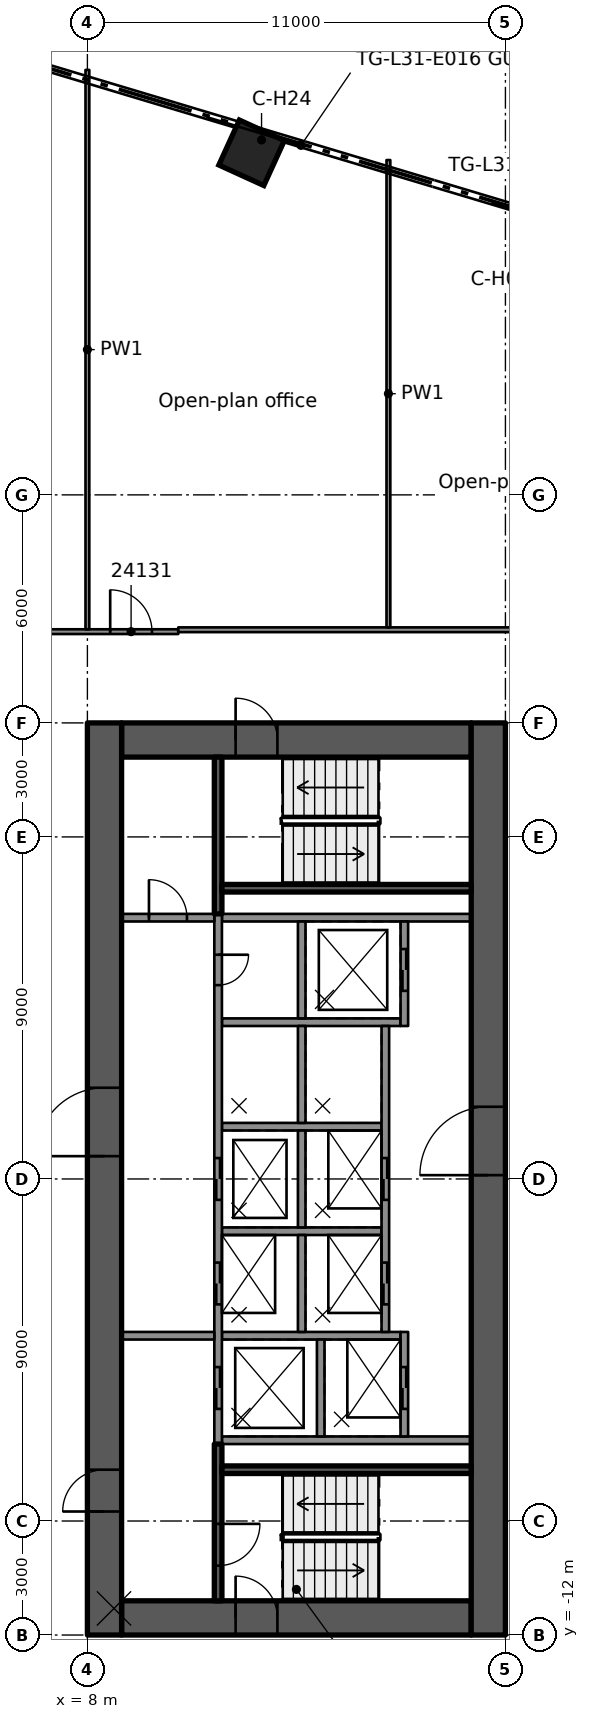
"""IFC4 building model, lengths in metres.
Left out: names, types, materials, properties, quantities, classifications, styles, units other than length and angle.
Written with IfcOpenShell. Run it as: python <this file> out.ifc"""

import sys

from ifc_helpers import new_model, si_unit, direction, frame, frame_2d, origin, origin_2d, place, context, subcontext, project, spatial, rectangle, extrude, element, fill, save


model = new_model("IFC4")
c1 = context("Model", 3, precision=1e-05, world=origin(), true_north=direction((0.0, 1.0)))
c2 = subcontext(c1, "Body", "Model", "MODEL_VIEW")
j1 = project(units=[si_unit("LENGTHUNIT", "METRE"), si_unit("PLANEANGLEUNIT", "RADIAN")], contexts=[c1])
p1 = place(None, origin())
s1 = spatial("IfcSite", under=j1, at=p1, CompositionType="ELEMENT")
p2 = place(p1, origin())
s2 = spatial("IfcBuilding", under=s1, at=p2, CompositionType="ELEMENT")
p3 = place(p2, frame((0.0, 0.0, 123.7)))
s3 = spatial("IfcBuildingStorey", under=s2, at=p3, CompositionType="ELEMENT", Elevation=123.7)
p4 = place(p3, frame((8.9, 11.55, 0.0), z_axis=(0.0, 0.0, 1.0), x_axis=(1.0, 0.0, 0.0)))
e1 = element("IfcWall", 1, at=p4, inside=s3, PredefinedType="SHEAR", context=c2, shape_type="SweptSolid", body=[
    extrude(rectangle(XDim=9.2, YDim=0.9, at=frame_2d((4.6, 0.0))), origin(), (0.0, 0.0, 1.0), 3.5),
])
p5 = place(p4, frame((3.0, 0.0, 0.0)))
e2 = element("IfcOpeningElement", 2, at=p5, cuts=e1, PredefinedType="OPENING", context=c2, shape_type="SweptSolid", body=[
    extrude(rectangle(XDim=1.1, YDim=2.1, at=frame_2d((0.55, 1.05))), frame((0.0, 0.46, 0.0), z_axis=(0.0, -1.0, 0.0), x_axis=(1.0, 0.0, 0.0)), (0.0, 0.0, 1.0), 0.92),
])
p6 = place(p3, frame((8.9, -11.55, 0.0), z_axis=(0.0, 0.0, 1.0), x_axis=(1.0, 0.0, 0.0)))
e3 = element("IfcWall", 3, at=p6, inside=s3, PredefinedType="SHEAR", context=c2, shape_type="SweptSolid", body=[
    extrude(rectangle(XDim=9.2, YDim=0.9, at=frame_2d((4.6, 0.0))), origin(), (0.0, 0.0, 1.0), 3.5),
])
p7 = place(p6, frame((3.0, 0.0, 0.0)))
e4 = element("IfcOpeningElement", 4, at=p7, cuts=e3, PredefinedType="OPENING", context=c2, shape_type="SweptSolid", body=[
    extrude(rectangle(XDim=1.1, YDim=2.1, at=frame_2d((0.55, 1.05))), frame((0.0, 0.46, 0.0), z_axis=(0.0, -1.0, 0.0), x_axis=(1.0, 0.0, 0.0)), (0.0, 0.0, 1.0), 0.92),
])
p8 = place(p3, frame((8.45, -12.0, 0.0), z_axis=(0.0, 0.0, 1.0), x_axis=(0.0, 1.0, 0.0)))
e5 = element("IfcWall", 5, at=p8, inside=s3, PredefinedType="SHEAR", context=c2, shape_type="SweptSolid", body=[
    extrude(rectangle(XDim=24.0, YDim=0.9, at=frame_2d((12.0, 0.0))), origin(), (0.0, 0.0, 1.0), 3.5),
])
p9 = place(p8, frame((12.6, 0.0, 0.0)))
e6 = element("IfcOpeningElement", 6, at=p9, cuts=e5, PredefinedType="OPENING", context=c2, shape_type="SweptSolid", body=[
    extrude(rectangle(XDim=1.8, YDim=2.1, at=frame_2d((0.9, 1.05))), frame((0.0, 0.46, 0.0), z_axis=(0.0, -1.0, 0.0), x_axis=(1.0, 0.0, 0.0)), (0.0, 0.0, 1.0), 0.92),
])
p10 = place(p8, frame((3.25, 0.0, 0.0)))
e7 = element("IfcOpeningElement", 7, at=p10, cuts=e5, PredefinedType="OPENING", context=c2, shape_type="SweptSolid", body=[
    extrude(rectangle(XDim=1.1, YDim=2.1, at=frame_2d((0.55, 1.05))), frame((0.0, 0.46, 0.0), z_axis=(0.0, -1.0, 0.0), x_axis=(1.0, 0.0, 0.0)), (0.0, 0.0, 1.0), 0.92),
])
p11 = place(p3, frame((18.55, -12.0, 0.0), z_axis=(0.0, 0.0, 1.0), x_axis=(0.0, 1.0, 0.0)))
e8 = element("IfcWall", 8, at=p11, inside=s3, PredefinedType="SHEAR", context=c2, shape_type="SweptSolid", body=[
    extrude(rectangle(XDim=24.0, YDim=0.9, at=frame_2d((12.0, 0.0))), origin(), (0.0, 0.0, 1.0), 3.5),
])
p12 = place(p11, frame((12.1, 0.0, 0.0)))
e9 = element("IfcOpeningElement", 9, at=p12, cuts=e8, PredefinedType="OPENING", context=c2, shape_type="SweptSolid", body=[
    extrude(rectangle(XDim=1.8, YDim=2.1, at=frame_2d((0.9, 1.05))), frame((0.0, 0.46, 0.0), z_axis=(0.0, -1.0, 0.0), x_axis=(1.0, 0.0, 0.0)), (0.0, 0.0, 1.0), 0.92),
])
p13 = place(p3, frame((12.321, 27.001, 0.0), z_axis=(0.0, 0.0, 1.0), x_axis=(0.415137884087, 0.909758504877, 0.0)))
e10 = element("IfcColumn", 10, at=p13, inside=s3, PredefinedType="COLUMN", context=c2, shape_type="SweptSolid", body=[
    extrude(rectangle(XDim=1.3, YDim=1.3, at=origin_2d()), origin(), (0.0, 0.0, 1.0), 3.5),
])
for number, where, z_axis, x_axis in (
    (11, (11.54, -6.875, 0.0), (0.0, 0.0, 1.0), (1.0, 0.0, 0.0)),
    (12, (11.54, 6.875, 0.0), (0.0, 0.0, 1.0), (1.0, 0.0, 0.0)),
):
    element("IfcWall", number, at=place(p3, frame(where, z_axis=z_axis, x_axis=x_axis)), inside=s3, PredefinedType="SOLIDWALL", context=c2, shape_type="SweptSolid", body=[
        extrude(rectangle(XDim=6.56, YDim=0.2, at=frame_2d((3.28, 0.0))), origin(), (0.0, 0.0, 1.0), 3.09),
    ])
p14 = place(p3, frame((11.54, 4.125, 0.0), z_axis=(0.0, 0.0, 1.0), x_axis=(1.0, 0.0, 0.0)))
e13 = element("IfcWall", 13, at=p14, inside=s3, PredefinedType="SOLIDWALL", context=c2, shape_type="SweptSolid", body=[
    extrude(rectangle(XDim=4.7, YDim=0.2, at=frame_2d((2.35, 0.0))), origin(), (0.0, 0.0, 1.0), 3.09),
])
for number, where, z_axis, x_axis in (
    (14, (11.54, 1.375, 0.0), (0.0, 0.0, 1.0), (1.0, 0.0, 0.0)),
    (15, (11.54, -1.375, 0.0), (0.0, 0.0, 1.0), (1.0, 0.0, 0.0)),
):
    element("IfcWall", number, at=place(p3, frame(where, z_axis=z_axis, x_axis=x_axis)), inside=s3, PredefinedType="SOLIDWALL", context=c2, shape_type="SweptSolid", body=[
        extrude(rectangle(XDim=4.2, YDim=0.2, at=frame_2d((2.1, 0.0))), origin(), (0.0, 0.0, 1.0), 3.09),
    ])
p15 = place(p3, frame((11.54, -4.125, 0.0), z_axis=(0.0, 0.0, 1.0), x_axis=(1.0, 0.0, 0.0)))
e16 = element("IfcWall", 16, at=p15, inside=s3, PredefinedType="SOLIDWALL", context=c2, shape_type="SweptSolid", body=[
    extrude(rectangle(XDim=4.7, YDim=0.2, at=frame_2d((2.35, 0.0))), origin(), (0.0, 0.0, 1.0), 3.09),
])
p16 = place(p3, frame((11.44, 6.975, 0.0), z_axis=(0.0, 0.0, 1.0), x_axis=(0.0, -1.0, 0.0)))
e17 = element("IfcWall", 17, at=p16, inside=s3, PredefinedType="SOLIDWALL", context=c2, shape_type="SweptSolid", body=[
    extrude(rectangle(XDim=13.95, YDim=0.2, at=frame_2d((6.975, 0.0))), origin(), (0.0, 0.0, 1.0), 3.09),
])
p17 = place(p16, frame((6.425, 0.0, 0.0)))
e18 = element("IfcOpeningElement", 18, at=p17, cuts=e17, PredefinedType="OPENING", context=c2, shape_type="SweptSolid", body=[
    extrude(rectangle(XDim=1.1, YDim=2.1, at=frame_2d((0.55, 1.05))), frame((0.0, 0.11, 0.0), z_axis=(0.0, -1.0, 0.0), x_axis=(1.0, 0.0, 0.0)), (0.0, 0.0, 1.0), 0.22),
])
p18 = place(p16, frame((9.175, 0.0, 0.0)))
e19 = element("IfcOpeningElement", 19, at=p18, cuts=e17, PredefinedType="OPENING", context=c2, shape_type="SweptSolid", body=[
    extrude(rectangle(XDim=1.1, YDim=2.1, at=frame_2d((0.55, 1.05))), frame((0.0, 0.11, 0.0), z_axis=(0.0, -1.0, 0.0), x_axis=(1.0, 0.0, 0.0)), (0.0, 0.0, 1.0), 0.22),
])
p19 = place(p16, frame((11.925, 0.0, 0.0)))
e20 = element("IfcOpeningElement", 20, at=p19, cuts=e17, PredefinedType="OPENING", context=c2, shape_type="SweptSolid", body=[
    extrude(rectangle(XDim=1.1, YDim=2.1, at=frame_2d((0.55, 1.05))), frame((0.0, 0.11, 0.0), z_axis=(0.0, -1.0, 0.0), x_axis=(1.0, 0.0, 0.0)), (0.0, 0.0, 1.0), 0.22),
])
p20 = place(p16, frame((1.075, 0.0, 0.0)))
e21 = element("IfcOpeningElement", 21, at=p20, cuts=e17, PredefinedType="OPENING", context=c2, shape_type="SweptSolid", body=[
    extrude(rectangle(XDim=0.8, YDim=2.1, at=frame_2d((0.4, 1.05))), frame((0.0, 0.11, 0.0), z_axis=(0.0, -1.0, 0.0), x_axis=(1.0, 0.0, 0.0)), (0.0, 0.0, 1.0), 0.22),
])
for number, where, z_axis, x_axis in (
    (22, (13.64, 6.775, 0.0), (0.0, 0.0, 1.0), (0.0, -1.0, 0.0)),
    (23, (13.64, 4.025, 0.0), (0.0, 0.0, 1.0), (0.0, -1.0, 0.0)),
    (24, (13.64, 1.275, 0.0), (0.0, 0.0, 1.0), (0.0, -1.0, 0.0)),
    (25, (13.64, -1.475, 0.0), (0.0, 0.0, 1.0), (0.0, -1.0, 0.0)),
    (26, (14.14, -4.225, 0.0), (0.0, 0.0, 1.0), (0.0, -1.0, 0.0)),
):
    element("IfcWall", number, at=place(p3, frame(where, z_axis=z_axis, x_axis=x_axis)), inside=s3, PredefinedType="SOLIDWALL", context=c2, shape_type="SweptSolid", body=[
        extrude(rectangle(XDim=2.55, YDim=0.2, at=frame_2d((1.275, 0.0))), origin(), (0.0, 0.0, 1.0), 3.09),
    ])
p21 = place(p3, frame((16.34, 6.775, 0.0), z_axis=(0.0, 0.0, 1.0), x_axis=(0.0, -1.0, 0.0)))
e27 = element("IfcWall", 27, at=p21, inside=s3, PredefinedType="SOLIDWALL", context=c2, shape_type="SweptSolid", body=[
    extrude(rectangle(XDim=2.75, YDim=0.2, at=frame_2d((1.375, 0.0))), origin(), (0.0, 0.0, 1.0), 3.09),
])
p22 = place(p21, frame((0.725, 0.0, 0.0)))
e28 = element("IfcOpeningElement", 28, at=p22, cuts=e27, PredefinedType="OPENING", context=c2, shape_type="SweptSolid", body=[
    extrude(rectangle(XDim=1.1, YDim=2.1, at=frame_2d((0.55, 1.05))), frame((0.0, 0.11, 0.0), z_axis=(0.0, -1.0, 0.0), x_axis=(1.0, 0.0, 0.0)), (0.0, 0.0, 1.0), 0.22),
])
p23 = place(p3, frame((15.84, 4.025, 0.0), z_axis=(0.0, 0.0, 1.0), x_axis=(0.0, -1.0, 0.0)))
e29 = element("IfcWall", 29, at=p23, inside=s3, PredefinedType="SOLIDWALL", context=c2, shape_type="SweptSolid", body=[
    extrude(rectangle(XDim=8.05, YDim=0.2, at=frame_2d((4.025, 0.0))), origin(), (0.0, 0.0, 1.0), 3.09),
])
p24 = place(p23, frame((3.475, 0.0, 0.0)))
e30 = element("IfcOpeningElement", 30, at=p24, cuts=e29, PredefinedType="OPENING", context=c2, shape_type="SweptSolid", body=[
    extrude(rectangle(XDim=1.1, YDim=2.1, at=frame_2d((0.55, 1.05))), frame((0.0, 0.11, 0.0), z_axis=(0.0, -1.0, 0.0), x_axis=(1.0, 0.0, 0.0)), (0.0, 0.0, 1.0), 0.22),
])
p25 = place(p23, frame((6.225, 0.0, 0.0)))
e31 = element("IfcOpeningElement", 31, at=p25, cuts=e29, PredefinedType="OPENING", context=c2, shape_type="SweptSolid", body=[
    extrude(rectangle(XDim=1.1, YDim=2.1, at=frame_2d((0.55, 1.05))), frame((0.0, 0.11, 0.0), z_axis=(0.0, -1.0, 0.0), x_axis=(1.0, 0.0, 0.0)), (0.0, 0.0, 1.0), 0.22),
])
p26 = place(p3, frame((16.34, -4.025, 0.0), z_axis=(0.0, 0.0, 1.0), x_axis=(0.0, -1.0, 0.0)))
e32 = element("IfcWall", 32, at=p26, inside=s3, PredefinedType="SOLIDWALL", context=c2, shape_type="SweptSolid", body=[
    extrude(rectangle(XDim=2.75, YDim=0.2, at=frame_2d((1.375, 0.0))), origin(), (0.0, 0.0, 1.0), 3.09),
])
p27 = place(p26, frame((0.925, 0.0, 0.0)))
e33 = element("IfcOpeningElement", 33, at=p27, cuts=e32, PredefinedType="OPENING", context=c2, shape_type="SweptSolid", body=[
    extrude(rectangle(XDim=1.1, YDim=2.1, at=frame_2d((0.55, 1.05))), frame((0.0, 0.11, 0.0), z_axis=(0.0, -1.0, 0.0), x_axis=(1.0, 0.0, 0.0)), (0.0, 0.0, 1.0), 0.22),
])
p28 = place(p3, frame((11.44, -6.975, 0.0), z_axis=(0.0, 0.0, 1.0), x_axis=(0.0, -1.0, 0.0)))
e34 = element("IfcWall", 34, at=p28, inside=s3, PredefinedType="SOLIDWALL", context=c2, shape_type="SweptSolid", body=[
    extrude(rectangle(XDim=4.125, YDim=0.2, at=frame_2d((2.062, 0.0))), origin(), (0.0, 0.0, 1.0), 3.09),
])
p29 = place(p28, frame((2.1, 0.0, 0.0)))
e35 = element("IfcOpeningElement", 35, at=p29, cuts=e34, PredefinedType="OPENING", context=c2, shape_type="SweptSolid", body=[
    extrude(rectangle(XDim=1.1, YDim=2.1, at=frame_2d((0.55, 1.05))), frame((0.0, 0.11, 0.0), z_axis=(0.0, -1.0, 0.0), x_axis=(1.0, 0.0, 0.0)), (0.0, 0.0, 1.0), 0.22),
])
p30 = place(p3, frame((11.54, -7.65, 0.0), z_axis=(0.0, 0.0, 1.0), x_axis=(1.0, 0.0, 0.0)))
e36 = element("IfcWall", 36, at=p30, inside=s3, PredefinedType="SOLIDWALL", context=c2, shape_type="SweptSolid", body=[
    extrude(rectangle(XDim=6.56, YDim=0.2, at=frame_2d((3.28, 0.0))), origin(), (0.0, 0.0, 1.0), 3.09),
])
p31 = place(p3, frame((11.44, 11.1, 0.0), z_axis=(0.0, 0.0, 1.0), x_axis=(0.0, -1.0, 0.0)))
e37 = element("IfcWall", 37, at=p31, inside=s3, PredefinedType="SOLIDWALL", context=c2, shape_type="SweptSolid", body=[
    extrude(rectangle(XDim=4.125, YDim=0.2, at=frame_2d((2.062, 0.0))), origin(), (0.0, 0.0, 1.0), 3.09),
])
p32 = place(p3, frame((11.54, 7.65, 0.0), z_axis=(0.0, 0.0, 1.0), x_axis=(1.0, 0.0, 0.0)))
e38 = element("IfcWall", 38, at=p32, inside=s3, PredefinedType="SOLIDWALL", context=c2, shape_type="SweptSolid", body=[
    extrude(rectangle(XDim=6.56, YDim=0.2, at=frame_2d((3.28, 0.0))), origin(), (0.0, 0.0, 1.0), 3.09),
])
p33 = place(p3, frame((8.9, -4.125, 0.0), z_axis=(0.0, 0.0, 1.0), x_axis=(1.0, 0.0, 0.0)))
e39 = element("IfcWall", 39, at=p33, inside=s3, PredefinedType="PARTITIONING", context=c2, shape_type="SweptSolid", body=[
    extrude(rectangle(XDim=2.44, YDim=0.2, at=frame_2d((1.22, 0.0))), origin(), (0.0, 0.0, 1.0), 3.09),
])
p34 = place(p3, frame((8.9, 6.875, 0.0), z_axis=(0.0, 0.0, 1.0), x_axis=(1.0, 0.0, 0.0)))
e40 = element("IfcWall", 40, at=p34, inside=s3, PredefinedType="PARTITIONING", context=c2, shape_type="SweptSolid", body=[
    extrude(rectangle(XDim=2.44, YDim=0.2, at=frame_2d((1.22, 0.0))), origin(), (0.0, 0.0, 1.0), 3.09),
])
p35 = place(p34, frame((0.72, 0.0, 0.0)))
e41 = element("IfcOpeningElement", 41, at=p35, cuts=e40, PredefinedType="OPENING", context=c2, shape_type="SweptSolid", body=[
    extrude(rectangle(XDim=1.0, YDim=2.1, at=frame_2d((0.5, 1.05))), frame((0.0, 0.11, 0.0), z_axis=(0.0, -1.0, 0.0), x_axis=(1.0, 0.0, 0.0)), (0.0, 0.0, 1.0), 0.22),
])
p36 = place(p3, frame((-10.39, 14.401, 0.0), z_axis=(0.0, 0.0, 1.0), x_axis=(1.0, 0.0, 0.0)))
e42 = element("IfcWall", 42, at=p36, inside=s3, PredefinedType="PARTITIONING", context=c2, shape_type="SweptSolid", body=[
    extrude(rectangle(XDim=20.781, YDim=0.125, at=frame_2d((10.391, 0.0))), origin(), (0.0, 0.0, 1.0), 3.08),
])
p37 = place(p36, frame((18.99, 0.0, 0.0)))
e43 = element("IfcOpeningElement", 43, at=p37, cuts=e42, PredefinedType="OPENING", context=c2, shape_type="SweptSolid", body=[
    extrude(rectangle(XDim=1.1, YDim=2.1, at=frame_2d((0.55, 1.05))), frame((0.0, 0.073, 0.0), z_axis=(0.0, -1.0, 0.0), x_axis=(1.0, 0.0, 0.0)), (0.0, 0.0, 1.0), 0.145),
])
p38 = place(p36, frame((13.49, 0.0, 0.0)))
e44 = element("IfcOpeningElement", 44, at=p38, cuts=e42, PredefinedType="OPENING", context=c2, shape_type="SweptSolid", body=[
    extrude(rectangle(XDim=1.8, YDim=2.1, at=frame_2d((0.9, 1.05))), frame((0.0, 0.073, 0.0), z_axis=(0.0, -1.0, 0.0), x_axis=(1.0, 0.0, 0.0)), (0.0, 0.0, 1.0), 0.145),
])
p39 = place(p36, frame((5.49, 0.0, 0.0)))
e45 = element("IfcOpeningElement", 45, at=p39, cuts=e42, PredefinedType="OPENING", context=c2, shape_type="SweptSolid", body=[
    extrude(rectangle(XDim=1.8, YDim=2.1, at=frame_2d((0.9, 1.05))), frame((0.0, 0.073, 0.0), z_axis=(0.0, -1.0, 0.0), x_axis=(1.0, 0.0, 0.0)), (0.0, 0.0, 1.0), 0.145),
])
p40 = place(p3, frame((10.391, 14.451, 0.0), z_axis=(0.0, 0.0, 1.0), x_axis=(1.0, 0.0, 0.0)))
e46 = element("IfcWall", 46, at=p40, inside=s3, PredefinedType="PARTITIONING", context=c2, shape_type="SweptSolid", body=[
    extrude(rectangle(XDim=10.996, YDim=0.125, at=frame_2d((5.498, 0.0))), origin(), (0.0, 0.0, 1.0), 3.08),
])
p41 = place(p3, frame((15.921, 14.514, 0.0), z_axis=(0.0, 0.0, 1.0), x_axis=(0.0, 1.0, 0.0)))
e47 = element("IfcWall", 47, at=p41, inside=s3, PredefinedType="PARTITIONING", context=c2, shape_type="SweptSolid", body=[
    extrude(rectangle(XDim=12.296, YDim=0.1, at=frame_2d((6.148, 0.0))), origin(), (0.0, 0.0, 1.0), 3.08),
])
p42 = place(p3, frame((8.0, 14.463, 0.0), z_axis=(0.0, 0.0, 1.0), x_axis=(0.0, 1.0, 0.0)))
e48 = element("IfcWall", 48, at=p42, inside=s3, PredefinedType="PARTITIONING", context=c2, shape_type="SweptSolid", body=[
    extrude(rectangle(XDim=14.719, YDim=0.1, at=frame_2d((7.359, 0.0))), origin(), (0.0, 0.0, 1.0), 3.08),
])
p43 = place(p22, origin())
e49 = element("IfcDoor", 49, at=p43, inside=s3, OperationType="DOUBLE_DOOR_SLIDING", PredefinedType="DOOR", context=c2, shape_type="SweptSolid", body=[
    extrude(rectangle(XDim=1.1, YDim=2.1, at=frame_2d((0.55, 1.05))), frame((0.0, 0.025, 0.0), z_axis=(0.0, -1.0, 0.0), x_axis=(1.0, 0.0, 0.0)), (0.0, 0.0, 1.0), 0.05),
])
fill(e28, e49)
p44 = place(p17, origin())
e50 = element("IfcDoor", 50, at=p44, inside=s3, OperationType="DOUBLE_DOOR_SLIDING", PredefinedType="DOOR", context=c2, shape_type="SweptSolid", body=[
    extrude(rectangle(XDim=1.1, YDim=2.1, at=frame_2d((0.55, 1.05))), frame((0.0, 0.025, 0.0), z_axis=(0.0, -1.0, 0.0), x_axis=(1.0, 0.0, 0.0)), (0.0, 0.0, 1.0), 0.05),
])
fill(e18, e50)
p45 = place(p24, origin())
e51 = element("IfcDoor", 51, at=p45, inside=s3, OperationType="DOUBLE_DOOR_SLIDING", PredefinedType="DOOR", context=c2, shape_type="SweptSolid", body=[
    extrude(rectangle(XDim=1.1, YDim=2.1, at=frame_2d((0.55, 1.05))), frame((0.0, 0.025, 0.0), z_axis=(0.0, -1.0, 0.0), x_axis=(1.0, 0.0, 0.0)), (0.0, 0.0, 1.0), 0.05),
])
fill(e30, e51)
p46 = place(p18, origin())
e52 = element("IfcDoor", 52, at=p46, inside=s3, OperationType="DOUBLE_DOOR_SLIDING", PredefinedType="DOOR", context=c2, shape_type="SweptSolid", body=[
    extrude(rectangle(XDim=1.1, YDim=2.1, at=frame_2d((0.55, 1.05))), frame((0.0, 0.025, 0.0), z_axis=(0.0, -1.0, 0.0), x_axis=(1.0, 0.0, 0.0)), (0.0, 0.0, 1.0), 0.05),
])
fill(e19, e52)
p47 = place(p25, origin())
e53 = element("IfcDoor", 53, at=p47, inside=s3, OperationType="DOUBLE_DOOR_SLIDING", PredefinedType="DOOR", context=c2, shape_type="SweptSolid", body=[
    extrude(rectangle(XDim=1.1, YDim=2.1, at=frame_2d((0.55, 1.05))), frame((0.0, 0.025, 0.0), z_axis=(0.0, -1.0, 0.0), x_axis=(1.0, 0.0, 0.0)), (0.0, 0.0, 1.0), 0.05),
])
fill(e31, e53)
p48 = place(p19, origin())
e54 = element("IfcDoor", 54, at=p48, inside=s3, OperationType="DOUBLE_DOOR_SLIDING", PredefinedType="DOOR", context=c2, shape_type="SweptSolid", body=[
    extrude(rectangle(XDim=1.1, YDim=2.1, at=frame_2d((0.55, 1.05))), frame((0.0, 0.025, 0.0), z_axis=(0.0, -1.0, 0.0), x_axis=(1.0, 0.0, 0.0)), (0.0, 0.0, 1.0), 0.05),
])
fill(e20, e54)
p49 = place(p27, origin())
e55 = element("IfcDoor", 55, at=p49, inside=s3, OperationType="DOUBLE_DOOR_SLIDING", PredefinedType="DOOR", context=c2, shape_type="SweptSolid", body=[
    extrude(rectangle(XDim=1.1, YDim=2.1, at=frame_2d((0.55, 1.05))), frame((0.0, 0.025, 0.0), z_axis=(0.0, -1.0, 0.0), x_axis=(1.0, 0.0, 0.0)), (0.0, 0.0, 1.0), 0.05),
])
fill(e33, e55)
p50 = place(p20, origin())
e56 = element("IfcDoor", 56, at=p50, inside=s3, OperationType="SINGLE_SWING_LEFT", PredefinedType="DOOR", context=c2, shape_type="SweptSolid", body=[
    extrude(rectangle(XDim=0.8, YDim=2.1, at=frame_2d((0.4, 1.05))), frame((0.0, 0.025, 0.0), z_axis=(0.0, -1.0, 0.0), x_axis=(1.0, 0.0, 0.0)), (0.0, 0.0, 1.0), 0.05),
])
fill(e21, e56)
p51 = place(p9, origin())
e57 = element("IfcDoor", 57, at=p51, inside=s3, OperationType="SINGLE_SWING_RIGHT", PredefinedType="DOOR", context=c2, shape_type="SweptSolid", body=[
    extrude(rectangle(XDim=1.8, YDim=2.1, at=frame_2d((0.9, 1.05))), frame((0.0, 0.025, 0.0), z_axis=(0.0, -1.0, 0.0), x_axis=(1.0, 0.0, 0.0)), (0.0, 0.0, 1.0), 0.05),
])
fill(e6, e57)
p52 = place(p12, origin())
e58 = element("IfcDoor", 58, at=p52, inside=s3, OperationType="SINGLE_SWING_RIGHT", PredefinedType="DOOR", context=c2, shape_type="SweptSolid", body=[
    extrude(rectangle(XDim=1.8, YDim=2.1, at=frame_2d((0.9, 1.05))), frame((0.0, 0.025, 0.0), z_axis=(0.0, -1.0, 0.0), x_axis=(1.0, 0.0, 0.0)), (0.0, 0.0, 1.0), 0.05),
])
fill(e9, e58)
p53 = place(p10, origin())
e59 = element("IfcDoor", 59, at=p53, inside=s3, OperationType="SINGLE_SWING_LEFT", PredefinedType="DOOR", context=c2, shape_type="SweptSolid", body=[
    extrude(rectangle(XDim=1.1, YDim=2.1, at=frame_2d((0.55, 1.05))), frame((0.0, 0.025, 0.0), z_axis=(0.0, -1.0, 0.0), x_axis=(1.0, 0.0, 0.0)), (0.0, 0.0, 1.0), 0.05),
])
fill(e7, e59)
p54 = place(p7, origin())
e60 = element("IfcDoor", 60, at=p54, inside=s3, OperationType="SINGLE_SWING_LEFT", PredefinedType="DOOR", context=c2, shape_type="SweptSolid", body=[
    extrude(rectangle(XDim=1.1, YDim=2.1, at=frame_2d((0.55, 1.05))), frame((0.0, 0.025, 0.0), z_axis=(0.0, -1.0, 0.0), x_axis=(1.0, 0.0, 0.0)), (0.0, 0.0, 1.0), 0.05),
])
fill(e4, e60)
p55 = place(p5, origin())
e61 = element("IfcDoor", 61, at=p55, inside=s3, OperationType="SINGLE_SWING_LEFT", PredefinedType="DOOR", context=c2, shape_type="SweptSolid", body=[
    extrude(rectangle(XDim=1.1, YDim=2.1, at=frame_2d((0.55, 1.05))), frame((0.0, 0.025, 0.0), z_axis=(0.0, -1.0, 0.0), x_axis=(1.0, 0.0, 0.0)), (0.0, 0.0, 1.0), 0.05),
])
fill(e2, e61)
p56 = place(p29, origin())
e62 = element("IfcDoor", 62, at=p56, inside=s3, OperationType="SINGLE_SWING_RIGHT", PredefinedType="DOOR", context=c2, shape_type="SweptSolid", body=[
    extrude(rectangle(XDim=1.1, YDim=2.1, at=frame_2d((0.55, 1.05))), frame((0.0, 0.025, 0.0), z_axis=(0.0, -1.0, 0.0), x_axis=(1.0, 0.0, 0.0)), (0.0, 0.0, 1.0), 0.05),
])
fill(e35, e62)
p57 = place(p35, origin())
e63 = element("IfcDoor", 63, at=p57, inside=s3, OperationType="SINGLE_SWING_RIGHT", PredefinedType="DOOR", context=c2, shape_type="SweptSolid", body=[
    extrude(rectangle(XDim=1.0, YDim=2.1, at=frame_2d((0.5, 1.05))), frame((0.0, 0.025, 0.0), z_axis=(0.0, -1.0, 0.0), x_axis=(1.0, 0.0, 0.0)), (0.0, 0.0, 1.0), 0.05),
])
fill(e41, e63)
p58 = place(p37, origin())
e64 = element("IfcDoor", 64, at=p58, inside=s3, OperationType="SINGLE_SWING_RIGHT", PredefinedType="DOOR", context=c2, shape_type="SweptSolid", body=[
    extrude(rectangle(XDim=1.1, YDim=2.1, at=frame_2d((0.55, 1.05))), frame((0.0, 0.025, 0.0), z_axis=(0.0, -1.0, 0.0), x_axis=(1.0, 0.0, 0.0)), (0.0, 0.0, 1.0), 0.05),
])
fill(e43, e64)
save(model, sys.argv[1])
